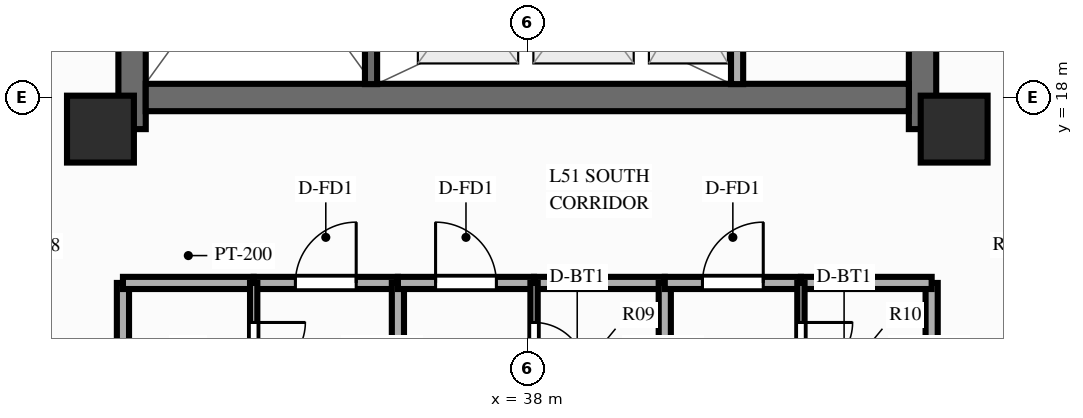
"""IFC4 building model, lengths in metres.
Left out: names, types, materials, properties, quantities, classifications, styles, units other than length and angle.
Written with IfcOpenShell. Run it as: python <this file> out.ifc"""

import sys

from ifc_helpers import new_model, si_unit, direction, frame, frame_2d, origin, origin_2d, place, context, subcontext, project, spatial, rectangle, extrude, source, transform, mapped, element, fill, save


model = new_model("IFC4")
c1 = context("Model", 3, precision=1e-05, world=origin(), true_north=direction((0.0, 1.0)))
c2 = subcontext(c1, "Body", "Model", "MODEL_VIEW")
j1 = project(units=[si_unit("LENGTHUNIT", "METRE"), si_unit("PLANEANGLEUNIT", "RADIAN")], contexts=[c1])
p1 = place(None, origin())
s1 = spatial("IfcSite", under=j1, at=p1, CompositionType="ELEMENT")
p2 = place(p1, origin())
s2 = spatial("IfcBuilding", under=s1, at=p2, CompositionType="ELEMENT")
p3 = place(p2, frame((0.0, 0.0, 163.0)))
s3 = spatial("IfcBuildingStorey", under=s2, at=p3, CompositionType="ELEMENT", Elevation=163.0)
p4 = place(p3, frame((31.5, 17.48, 0.0), z_axis=(0.0, 0.0, 1.0), x_axis=(0.0, 1.0, 0.0)))
e1 = element("IfcWall", 1, at=p4, inside=s3, PredefinedType="SHEAR", context=c2, shape_type="SweptSolid", body=[
    extrude(rectangle(XDim=19.04, YDim=0.45, at=frame_2d((9.52, 0.0))), origin(), (0.0, 0.0, 1.0), 3.0),
])
p5 = place(p4, frame((6.32, 0.0, 0.0)))
e2 = element("IfcOpeningElement", 2, at=p5, cuts=e1, PredefinedType="OPENING", context=c2, shape_type="SweptSolid", body=[
    extrude(rectangle(XDim=1.1, YDim=2.15, at=frame_2d((0.55, 1.075))), frame((0.0, 0.237, 0.0), z_axis=(0.0, -1.0, 0.0), x_axis=(1.0, 0.0, 0.0)), (0.0, 0.0, 1.0), 0.474),
])
p6 = place(p3, frame((44.5, 17.48, 0.0), z_axis=(0.0, 0.0, 1.0), x_axis=(0.0, 1.0, 0.0)))
e3 = element("IfcWall", 3, at=p6, inside=s3, PredefinedType="SHEAR", context=c2, shape_type="SweptSolid", body=[
    extrude(rectangle(XDim=19.04, YDim=0.45, at=frame_2d((9.52, 0.0))), origin(), (0.0, 0.0, 1.0), 3.0),
])
p7 = place(p6, frame((12.67, 0.0, 0.0), z_axis=(0.0, 0.0, 1.0), x_axis=(-1.0, 0.0, 0.0)))
e4 = element("IfcOpeningElement", 4, at=p7, cuts=e3, PredefinedType="OPENING", context=c2, shape_type="SweptSolid", body=[
    extrude(rectangle(XDim=1.1, YDim=2.15, at=frame_2d((0.55, 1.075))), frame((0.0, 0.237, 0.0), z_axis=(0.0, -1.0, 0.0), x_axis=(1.0, 0.0, 0.0)), (0.0, 0.0, 1.0), 0.474),
])
p8 = place(p3, frame((31.725, 18.0, 0.0), z_axis=(0.0, 0.0, 1.0), x_axis=(1.0, 0.0, 0.0)))
e5 = element("IfcWall", 5, at=p8, inside=s3, PredefinedType="SHEAR", context=c2, shape_type="SweptSolid", body=[
    extrude(rectangle(XDim=12.55, YDim=0.45, at=frame_2d((6.275, 0.0))), origin(), (0.0, 0.0, 1.0), 3.0),
])
m1 = source(origin(), c2, "Body", "SweptSolid", [
    extrude(rectangle(XDim=1.1, YDim=1.1, at=origin_2d()), origin(), (0.0, 0.0, 1.0), 3.0),
])
for number, where, z_axis, x_axis in (
    (6, (30.98, 17.48, 0.0), (0.0, 0.0, 1.0), (1.0, 0.0, 0.0)),
    (7, (45.02, 17.48, 0.0), (0.0, 0.0, 1.0), (1.0, 0.0, 0.0)),
):
    element("IfcColumn", number, at=place(p3, frame(where, z_axis=z_axis, x_axis=x_axis)), inside=s3, PredefinedType="COLUMN", context=c2, shape_type="MappedRepresentation", body=[
        mapped(m1, transform((0.0, 0.0, 0.0), scale=1.0)),
    ])
p9 = place(p3, frame((41.45, 18.22, 0.0), z_axis=(0.0, 0.0, 1.0), x_axis=(0.0, 1.0, 0.0)))
e8 = element("IfcWall", 8, at=p9, inside=s3, PredefinedType="PARTITIONING", context=c2, shape_type="SweptSolid", body=[
    extrude(rectangle(XDim=2.96, YDim=0.2, at=frame_2d((1.48, 0.0))), origin(), (0.0, 0.0, 1.0), 2.79),
])
p10 = place(p3, frame((35.43, 18.22, 0.0), z_axis=(0.0, 0.0, 1.0), x_axis=(0.0, 1.0, 0.0)))
e9 = element("IfcWall", 9, at=p10, inside=s3, PredefinedType="SOLIDWALL", context=c2, shape_type="SweptSolid", body=[
    extrude(rectangle(XDim=7.22, YDim=0.2, at=frame_2d((3.61, 0.0))), origin(), (0.0, 0.0, 1.0), 2.79),
])
p11 = place(p10, frame((6.68, 0.0, 0.0), z_axis=(0.0, 0.0, 1.0), x_axis=(-1.0, 0.0, 0.0)))
e10 = element("IfcOpeningElement", 10, at=p11, cuts=e9, PredefinedType="OPENING", context=c2, shape_type="SweptSolid", body=[
    extrude(rectangle(XDim=1.1, YDim=2.15, at=frame_2d((0.55, 1.075))), frame((0.0, 0.112, 0.0), z_axis=(0.0, -1.0, 0.0), x_axis=(1.0, 0.0, 0.0)), (0.0, 0.0, 1.0), 0.224),
])
for number, where, z_axis, x_axis in (
    (11, (31.35, 14.95, 0.0), (0.0, 0.0, 1.0), (0.0, -1.0, 0.0)),
    (12, (44.65, 14.95, 0.0), (0.0, 0.0, 1.0), (0.0, -1.0, 0.0)),
):
    element("IfcWall", number, at=place(p3, frame(where, z_axis=z_axis, x_axis=x_axis)), inside=s3, PredefinedType="PARTITIONING", context=c2, shape_type="SweptSolid", body=[
        extrude(rectangle(XDim=8.8, YDim=0.2, at=frame_2d((4.4, 0.0))), origin(), (0.0, 0.0, 1.0), 2.34),
    ])
p12 = place(p3, frame((31.35, 14.95, 0.0), z_axis=(0.0, 0.0, 1.0), x_axis=(1.0, 0.0, 0.0)))
e13 = element("IfcWall", 13, at=p12, inside=s3, PredefinedType="PARTITIONING", context=c2, shape_type="SweptSolid", body=[
    extrude(rectangle(XDim=2.15, YDim=0.2, at=frame_2d((1.075, 0.0))), origin(), (0.0, 0.0, 1.0), 2.79),
])
p13 = place(p3, frame((33.5, 14.95, 0.0), z_axis=(0.0, 0.0, 1.0), x_axis=(1.0, 0.0, 0.0)))
e14 = element("IfcWall", 14, at=p13, inside=s3, PredefinedType="PARTITIONING", context=c2, shape_type="SweptSolid", body=[
    extrude(rectangle(XDim=2.372, YDim=0.2, at=frame_2d((1.186, 0.0))), origin(), (0.0, 0.0, 1.0), 2.79),
])
p14 = place(p13, frame((0.686, 0.0, 0.0)))
e15 = element("IfcOpeningElement", 15, at=p14, cuts=e14, PredefinedType="OPENING", context=c2, shape_type="SweptSolid", body=[
    extrude(rectangle(XDim=1.0, YDim=2.15, at=frame_2d((0.5, 1.075))), frame((0.0, 0.112, 0.0), z_axis=(0.0, -1.0, 0.0), x_axis=(1.0, 0.0, 0.0)), (0.0, 0.0, 1.0), 0.224),
])
p15 = place(p3, frame((33.5, 14.95, 0.0), z_axis=(0.0, 0.0, 1.0), x_axis=(0.0, -1.0, 0.0)))
e16 = element("IfcWall", 16, at=p15, inside=s3, PredefinedType="PARTITIONING", context=c2, shape_type="SweptSolid", body=[
    extrude(rectangle(XDim=2.15, YDim=0.12, at=frame_2d((1.075, 0.0))), origin(), (0.0, 0.0, 1.0), 2.79),
])
p16 = place(p15, frame((0.65, 0.0, 0.0)))
e17 = element("IfcOpeningElement", 17, at=p16, cuts=e16, PredefinedType="OPENING", context=c2, shape_type="SweptSolid", body=[
    extrude(rectangle(XDim=0.85, YDim=2.05, at=frame_2d((0.425, 1.025))), frame((0.0, 0.072, 0.0), z_axis=(0.0, -1.0, 0.0), x_axis=(1.0, 0.0, 0.0)), (0.0, 0.0, 1.0), 0.144),
])
p17 = place(p3, frame((35.872, 14.95, 0.0), z_axis=(0.0, 0.0, 1.0), x_axis=(0.0, -1.0, 0.0)))
e18 = element("IfcWall", 18, at=p17, inside=s3, PredefinedType="PARTITIONING", context=c2, shape_type="SweptSolid", body=[
    extrude(rectangle(XDim=8.8, YDim=0.2, at=frame_2d((4.4, 0.0))), origin(), (0.0, 0.0, 1.0), 2.79),
])
p18 = place(p3, frame((35.872, 14.95, 0.0), z_axis=(0.0, 0.0, 1.0), x_axis=(1.0, 0.0, 0.0)))
e19 = element("IfcWall", 19, at=p18, inside=s3, PredefinedType="PARTITIONING", context=c2, shape_type="SweptSolid", body=[
    extrude(rectangle(XDim=2.239, YDim=0.2, at=frame_2d((1.12, 0.0))), origin(), (0.0, 0.0, 1.0), 2.79),
])
p19 = place(p18, frame((0.619, 0.0, 0.0)))
e20 = element("IfcOpeningElement", 20, at=p19, cuts=e19, PredefinedType="OPENING", context=c2, shape_type="SweptSolid", body=[
    extrude(rectangle(XDim=1.0, YDim=2.15, at=frame_2d((0.5, 1.075))), frame((0.0, 0.112, 0.0), z_axis=(0.0, -1.0, 0.0), x_axis=(1.0, 0.0, 0.0)), (0.0, 0.0, 1.0), 0.224),
])
p20 = place(p3, frame((38.111, 14.95, 0.0), z_axis=(0.0, 0.0, 1.0), x_axis=(1.0, 0.0, 0.0)))
e21 = element("IfcWall", 21, at=p20, inside=s3, PredefinedType="PARTITIONING", context=c2, shape_type="SweptSolid", body=[
    extrude(rectangle(XDim=2.15, YDim=0.2, at=frame_2d((1.075, 0.0))), origin(), (0.0, 0.0, 1.0), 2.79),
])
p21 = place(p3, frame((38.111, 14.95, 0.0), z_axis=(0.0, 0.0, 1.0), x_axis=(0.0, -1.0, 0.0)))
e22 = element("IfcWall", 22, at=p21, inside=s3, PredefinedType="PARTITIONING", context=c2, shape_type="SweptSolid", body=[
    extrude(rectangle(XDim=2.15, YDim=0.12, at=frame_2d((1.075, 0.0))), origin(), (0.0, 0.0, 1.0), 2.79),
])
p22 = place(p21, frame((0.65, 0.0, 0.0)))
e23 = element("IfcOpeningElement", 23, at=p22, cuts=e22, PredefinedType="OPENING", context=c2, shape_type="SweptSolid", body=[
    extrude(rectangle(XDim=0.85, YDim=2.05, at=frame_2d((0.425, 1.025))), frame((0.0, 0.072, 0.0), z_axis=(0.0, -1.0, 0.0), x_axis=(1.0, 0.0, 0.0)), (0.0, 0.0, 1.0), 0.144),
])
p23 = place(p3, frame((40.261, 14.95, 0.0), z_axis=(0.0, 0.0, 1.0), x_axis=(0.0, -1.0, 0.0)))
e24 = element("IfcWall", 24, at=p23, inside=s3, PredefinedType="PARTITIONING", context=c2, shape_type="SweptSolid", body=[
    extrude(rectangle(XDim=8.8, YDim=0.2, at=frame_2d((4.4, 0.0))), origin(), (0.0, 0.0, 1.0), 2.79),
])
p24 = place(p3, frame((40.261, 14.95, 0.0), z_axis=(0.0, 0.0, 1.0), x_axis=(1.0, 0.0, 0.0)))
e25 = element("IfcWall", 25, at=p24, inside=s3, PredefinedType="PARTITIONING", context=c2, shape_type="SweptSolid", body=[
    extrude(rectangle(XDim=2.239, YDim=0.2, at=frame_2d((1.12, 0.0))), origin(), (0.0, 0.0, 1.0), 2.79),
])
p25 = place(p24, frame((0.619, 0.0, 0.0)))
e26 = element("IfcOpeningElement", 26, at=p25, cuts=e25, PredefinedType="OPENING", context=c2, shape_type="SweptSolid", body=[
    extrude(rectangle(XDim=1.0, YDim=2.15, at=frame_2d((0.5, 1.075))), frame((0.0, 0.112, 0.0), z_axis=(0.0, -1.0, 0.0), x_axis=(1.0, 0.0, 0.0)), (0.0, 0.0, 1.0), 0.224),
])
p26 = place(p3, frame((42.5, 14.95, 0.0), z_axis=(0.0, 0.0, 1.0), x_axis=(1.0, 0.0, 0.0)))
e27 = element("IfcWall", 27, at=p26, inside=s3, PredefinedType="PARTITIONING", context=c2, shape_type="SweptSolid", body=[
    extrude(rectangle(XDim=2.15, YDim=0.2, at=frame_2d((1.075, 0.0))), origin(), (0.0, 0.0, 1.0), 2.79),
])
p27 = place(p3, frame((42.5, 14.95, 0.0), z_axis=(0.0, 0.0, 1.0), x_axis=(0.0, -1.0, 0.0)))
e28 = element("IfcWall", 28, at=p27, inside=s3, PredefinedType="PARTITIONING", context=c2, shape_type="SweptSolid", body=[
    extrude(rectangle(XDim=2.15, YDim=0.12, at=frame_2d((1.075, 0.0))), origin(), (0.0, 0.0, 1.0), 2.79),
])
p28 = place(p27, frame((0.65, 0.0, 0.0)))
e29 = element("IfcOpeningElement", 29, at=p28, cuts=e28, PredefinedType="OPENING", context=c2, shape_type="SweptSolid", body=[
    extrude(rectangle(XDim=0.85, YDim=2.05, at=frame_2d((0.425, 1.025))), frame((0.0, 0.072, 0.0), z_axis=(0.0, -1.0, 0.0), x_axis=(1.0, 0.0, 0.0)), (0.0, 0.0, 1.0), 0.144),
])
m2 = source(origin(), c2, "Body", "SweptSolid", [
    extrude(rectangle(XDim=1.0, YDim=2.15, at=frame_2d((0.5, 1.075))), frame((0.0, 0.025, 0.0), z_axis=(0.0, -1.0, 0.0), x_axis=(1.0, 0.0, 0.0)), (0.0, 0.0, 1.0), 0.05),
])
p29 = place(p14, origin())
e30 = element("IfcDoor", 30, at=p29, inside=s3, OperationType="SINGLE_SWING_RIGHT", PredefinedType="DOOR", context=c2, shape_type="MappedRepresentation", body=[
    mapped(m2, transform((0.0, 0.0, 0.0), scale=1.0)),
])
fill(e15, e30)
m3 = source(origin(), c2, "Body", "SweptSolid", [
    extrude(rectangle(XDim=0.85, YDim=2.05, at=frame_2d((0.425, 1.025))), frame((0.0, 0.025, 0.0), z_axis=(0.0, -1.0, 0.0), x_axis=(1.0, 0.0, 0.0)), (0.0, 0.0, 1.0), 0.05),
])
p30 = place(p16, origin())
e31 = element("IfcDoor", 31, at=p30, inside=s3, OperationType="SINGLE_SWING_LEFT", PredefinedType="DOOR", context=c2, shape_type="MappedRepresentation", body=[
    mapped(m3, transform((0.0, 0.0, 0.0), scale=1.0)),
])
fill(e17, e31)
p31 = place(p19, origin())
e32 = element("IfcDoor", 32, at=p31, inside=s3, OperationType="SINGLE_SWING_LEFT", PredefinedType="DOOR", context=c2, shape_type="MappedRepresentation", body=[
    mapped(m2, transform((0.0, 0.0, 0.0), scale=1.0)),
])
fill(e20, e32)
p32 = place(p22, origin())
e33 = element("IfcDoor", 33, at=p32, inside=s3, OperationType="SINGLE_SWING_RIGHT", PredefinedType="DOOR", context=c2, shape_type="MappedRepresentation", body=[
    mapped(m3, transform((0.0, 0.0, 0.0), scale=1.0)),
])
fill(e23, e33)
p33 = place(p25, origin())
e34 = element("IfcDoor", 34, at=p33, inside=s3, OperationType="SINGLE_SWING_RIGHT", PredefinedType="DOOR", context=c2, shape_type="MappedRepresentation", body=[
    mapped(m2, transform((0.0, 0.0, 0.0), scale=1.0)),
])
fill(e26, e34)
p34 = place(p28, origin())
e35 = element("IfcDoor", 35, at=p34, inside=s3, OperationType="SINGLE_SWING_LEFT", PredefinedType="DOOR", context=c2, shape_type="MappedRepresentation", body=[
    mapped(m3, transform((0.0, 0.0, 0.0), scale=1.0)),
])
fill(e29, e35)
save(model, sys.argv[1])
